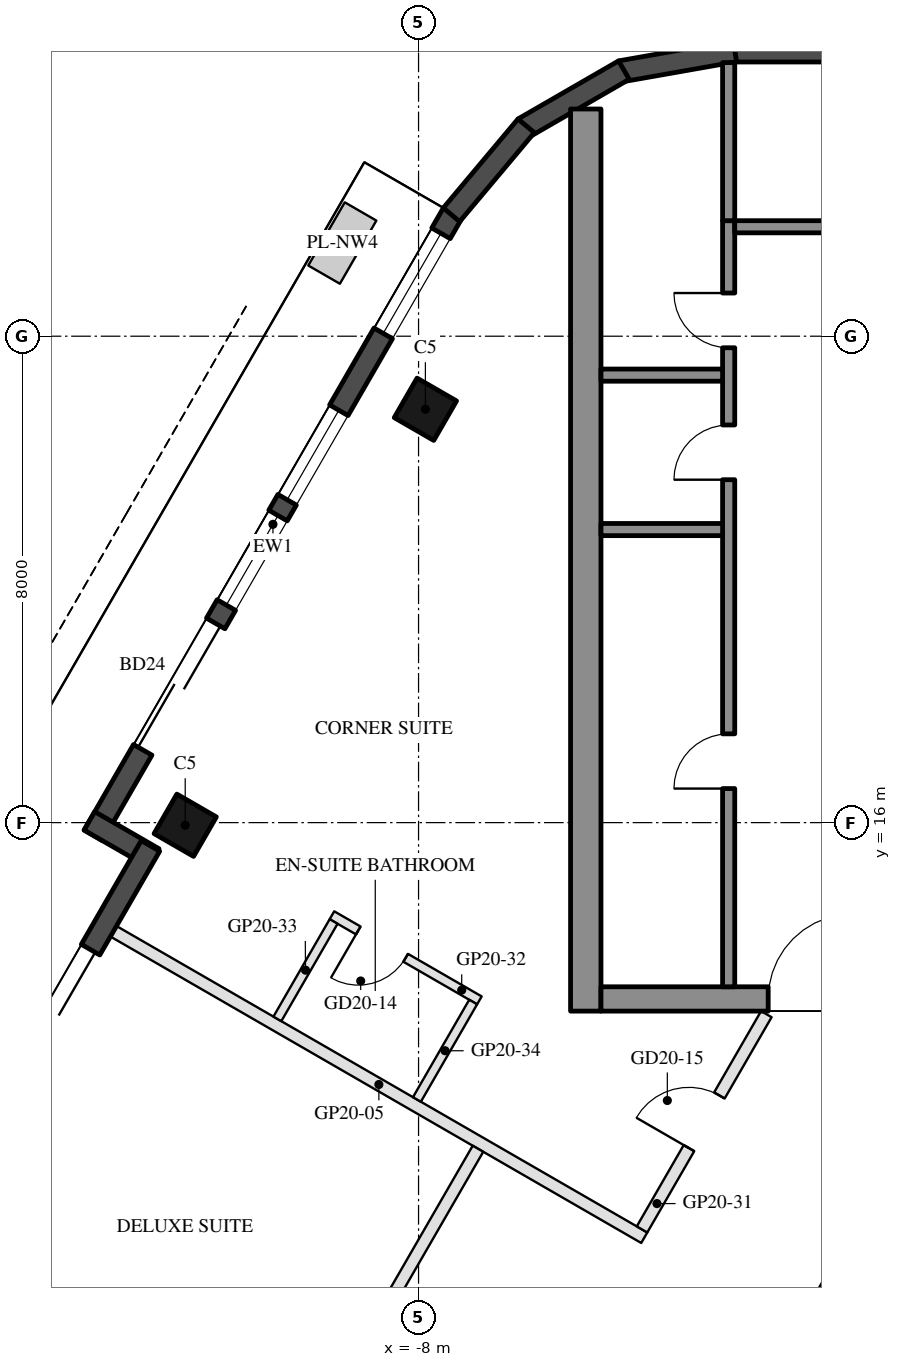
"""IFC4 building model, lengths in metres.
Left out: names, types, materials, properties, quantities, classifications, styles, units other than length and angle.
Written with IfcOpenShell. Run it as: python <this file> out.ifc"""

import sys

from ifc_helpers import new_model, si_unit, direction, frame, frame_2d, origin, origin_2d, place, context, subcontext, project, spatial, rectangle, hollow_rectangle, extrude, element, fill, save


model = new_model("IFC4")
c1 = context("Model", 3, precision=1e-05, world=origin(), true_north=direction((0.0, 1.0)))
c2 = subcontext(c1, "Body", "Model", "MODEL_VIEW")
j1 = project(units=[si_unit("LENGTHUNIT", "METRE"), si_unit("PLANEANGLEUNIT", "RADIAN")], contexts=[c1])
p1 = place(None, origin())
s1 = spatial("IfcSite", under=j1, at=p1, CompositionType="ELEMENT")
p2 = place(p1, origin())
s2 = spatial("IfcBuilding", under=s1, at=p2, CompositionType="ELEMENT")
p3 = place(p2, frame((0.0, 0.0, 209.5)))
s3 = spatial("IfcBuildingStorey", under=s2, at=p3, CompositionType="ELEMENT", Elevation=209.5)
for number, where, z_axis, x_axis in (
    (1, (-7.888, 22.798, 0.0), (0.0, 0.0, 1.0), (0.5, 0.866, 0.0)),
    (2, (-11.838, 15.957, 0.0), (0.0, 0.0, 1.0), (0.5, 0.866, 0.0)),
):
    element("IfcColumn", number, at=place(p3, frame(where, z_axis=z_axis, x_axis=x_axis)), inside=s3, PredefinedType="COLUMN", context=c2, shape_type="SweptSolid", body=[
        extrude(hollow_rectangle(XDim=0.75, YDim=0.75, WallThickness=0.035, at=origin_2d()), origin(), (0.0, 0.0, 1.0), 3.7),
    ])
p4 = place(p3, frame((-7.441, 26.022, 0.0), z_axis=(0.0, 0.0, 1.0), x_axis=(-0.499992533062, -0.86602971478, 0.0)))
e3 = element("IfcWall", 3, at=p4, inside=s3, PredefinedType="SOLIDWALL", context=c2, shape_type="SweptSolid", body=[
    extrude(rectangle(XDim=11.816, YDim=0.35, at=frame_2d((5.908, 0.0))), origin(), (0.0, 0.0, 1.0), 3.55),
])
p5 = place(p4, frame((0.381, 0.0, 0.3)))
e4 = element("IfcOpeningElement", 4, at=p5, cuts=e3, PredefinedType="OPENING", context=c2, shape_type="SweptSolid", body=[
    extrude(rectangle(XDim=1.9, YDim=2.65, at=frame_2d((0.95, 1.325))), frame((0.0, 0.185, 0.0), z_axis=(0.0, -1.0, 0.0), x_axis=(1.0, 0.0, 0.0)), (0.0, 0.0, 1.0), 0.37),
])
p6 = place(p4, frame((7.791, 0.0, 0.0)))
e5 = element("IfcOpeningElement", 5, at=p6, cuts=e3, PredefinedType="OPENING", context=c2, shape_type="SweptSolid", body=[
    extrude(rectangle(XDim=2.4, YDim=2.4, at=frame_2d((1.2, 1.2))), frame((0.0, 0.185, 0.0), z_axis=(0.0, -1.0, 0.0), x_axis=(1.0, 0.0, 0.0)), (0.0, 0.0, 1.0), 0.37),
])
p7 = place(p4, frame((3.741, 0.0, 0.3)))
e6 = element("IfcOpeningElement", 6, at=p7, cuts=e3, PredefinedType="OPENING", context=c2, shape_type="SweptSolid", body=[
    extrude(rectangle(XDim=1.7, YDim=2.65, at=frame_2d((0.85, 1.325))), frame((0.0, 0.185, 0.0), z_axis=(0.0, -1.0, 0.0), x_axis=(1.0, 0.0, 0.0)), (0.0, 0.0, 1.0), 0.37),
])
p8 = place(p4, frame((5.741, 0.0, 0.3)))
e7 = element("IfcOpeningElement", 7, at=p8, cuts=e3, PredefinedType="OPENING", context=c2, shape_type="SweptSolid", body=[
    extrude(rectangle(XDim=1.7, YDim=2.65, at=frame_2d((0.85, 1.325))), frame((0.0, 0.185, 0.0), z_axis=(0.0, -1.0, 0.0), x_axis=(1.0, 0.0, 0.0)), (0.0, 0.0, 1.0), 0.37),
])
p9 = place(p3, frame((-13.413, 16.029, 0.0), z_axis=(0.0, 0.0, 1.0), x_axis=(0.866005645448, -0.500034220881, 0.0)))
e8 = element("IfcWall", 8, at=p9, inside=s3, PredefinedType="SOLIDWALL", context=c2, shape_type="SweptSolid", body=[
    extrude(rectangle(XDim=1.22, YDim=0.35, at=frame_2d((0.61, 0.0))), origin(), (0.0, 0.0, 1.0), 3.55),
])
p10 = place(p3, frame((-12.409, 15.617, 0.0), z_axis=(0.0, 0.0, 1.0), x_axis=(-0.500003597184, -0.866023326939, 0.0)))
e9 = element("IfcWall", 9, at=p10, inside=s3, PredefinedType="SOLIDWALL", context=c2, shape_type="SweptSolid", body=[
    extrude(rectangle(XDim=6.74, YDim=0.35, at=frame_2d((3.37, 0.0))), origin(), (0.0, 0.0, 1.0), 3.55),
])
p11 = place(p10, frame((1.97, 0.0, 0.0)))
e10 = element("IfcOpeningElement", 10, at=p11, cuts=e9, PredefinedType="OPENING", context=c2, shape_type="SweptSolid", body=[
    extrude(rectangle(XDim=2.4, YDim=2.4, at=frame_2d((1.2, 1.2))), frame((0.0, 0.185, 0.0), z_axis=(0.0, -1.0, 0.0), x_axis=(1.0, 0.0, 0.0)), (0.0, 0.0, 1.0), 0.37),
])
p12 = place(p10, frame((4.67, 0.0, 0.3)))
e11 = element("IfcOpeningElement", 11, at=p12, cuts=e9, PredefinedType="OPENING", context=c2, shape_type="SweptSolid", body=[
    extrude(rectangle(XDim=1.2, YDim=2.65, at=frame_2d((0.6, 1.325))), frame((0.0, 0.185, 0.0), z_axis=(0.0, -1.0, 0.0), x_axis=(1.0, 0.0, 0.0)), (0.0, 0.0, 1.0), 0.37),
])
p13 = place(p3, frame((2.829, 28.685, 0.0), z_axis=(0.0, 0.0, 1.0), x_axis=(-1.0, 0.0, 0.0)))
e12 = element("IfcWall", 12, at=p13, inside=s3, PredefinedType="SOLIDWALL", context=c2, shape_type="SweptSolid", body=[
    extrude(rectangle(XDim=5.658, YDim=0.35, at=frame_2d((2.829, 0.0))), origin(), (0.0, 0.0, 1.0), 3.55),
])
for number, where, z_axis, x_axis in (
    (13, (-2.799, 28.688, 0.0), (0.0, 0.0, 1.0), (-0.985, -0.174, 0.0)),
    (14, (-4.623, 28.377, 0.0), (0.0, 0.0, 1.0), (-0.866, -0.5, 0.0)),
):
    element("IfcWall", number, at=place(p3, frame(where, z_axis=z_axis, x_axis=x_axis)), inside=s3, PredefinedType="SOLIDWALL", context=c2, shape_type="SweptSolid", body=[
        extrude(rectangle(XDim=1.91, YDim=0.35, at=frame_2d((0.955, 0.0))), origin(), (0.0, 0.0, 1.0), 3.55),
    ])
p14 = place(p3, frame((-6.23, 27.461, 0.0), z_axis=(0.0, 0.0, 1.0), x_axis=(-0.642808304945, -0.766027077259, 0.0)))
e15 = element("IfcWall", 15, at=p14, inside=s3, PredefinedType="SOLIDWALL", context=c2, shape_type="SweptSolid", body=[
    extrude(rectangle(XDim=1.91, YDim=0.35, at=frame_2d((0.955, 0.0))), origin(), (0.0, 0.0, 1.0), 3.55),
])
p15 = place(p3, frame((-5.25, 12.9, 0.0), z_axis=(0.0, 0.0, 1.0), x_axis=(0.0, 1.0, 0.0)))
e16 = element("IfcWall", 16, at=p15, inside=s3, PredefinedType="SHEAR", context=c2, shape_type="SweptSolid", body=[
    extrude(rectangle(XDim=14.837, YDim=0.5, at=frame_2d((7.418, 0.0))), origin(), (0.0, 0.0, 1.0), 3.5),
])
p16 = place(p3, frame((5.0, 13.1, 0.0), z_axis=(0.0, 0.0, 1.0), x_axis=(-1.0, 0.0, 0.0)))
e17 = element("IfcWall", 17, at=p16, inside=s3, PredefinedType="SHEAR", context=c2, shape_type="SweptSolid", body=[
    extrude(rectangle(XDim=10.0, YDim=0.4, at=frame_2d((5.0, 0.0))), origin(), (0.0, 0.0, 1.0), 3.5),
])
p17 = place(p16, frame((3.55, 0.0, 0.0)))
e18 = element("IfcOpeningElement", 18, at=p17, cuts=e17, PredefinedType="OPENING", context=c2, shape_type="SweptSolid", body=[
    extrude(rectangle(XDim=1.1, YDim=2.1, at=frame_2d((0.55, 1.05))), frame((0.0, 0.21, 0.0), z_axis=(0.0, -1.0, 0.0), x_axis=(1.0, 0.0, 0.0)), (0.0, 0.0, 1.0), 0.42),
])
p18 = place(p16, frame((5.85, 0.0, 0.0)))
e19 = element("IfcOpeningElement", 19, at=p18, cuts=e17, PredefinedType="OPENING", context=c2, shape_type="SweptSolid", body=[
    extrude(rectangle(XDim=1.4, YDim=2.1, at=frame_2d((0.7, 1.05))), frame((0.0, 0.21, 0.0), z_axis=(0.0, -1.0, 0.0), x_axis=(1.0, 0.0, 0.0)), (0.0, 0.0, 1.0), 0.42),
])
p19 = place(p3, frame((-2.9, 13.3, 0.0), z_axis=(0.0, 0.0, 1.0), x_axis=(0.0, 1.0, 0.0)))
e20 = element("IfcWall", 20, at=p19, inside=s3, PredefinedType="SHEAR", context=c2, shape_type="SweptSolid", body=[
    extrude(rectangle(XDim=12.6, YDim=0.2, at=frame_2d((6.3, 0.0))), origin(), (0.0, 0.0, 1.0), 3.5),
])
p20 = place(p19, frame((3.26, 0.0, 0.0)))
e21 = element("IfcOpeningElement", 21, at=p20, cuts=e20, PredefinedType="OPENING", context=c2, shape_type="SweptSolid", body=[
    extrude(rectangle(XDim=0.9, YDim=2.1, at=frame_2d((0.45, 1.05))), frame((0.0, 0.11, 0.0), z_axis=(0.0, -1.0, 0.0), x_axis=(1.0, 0.0, 0.0)), (0.0, 0.0, 1.0), 0.22),
])
p21 = place(p19, frame((8.34, 0.0, 0.0)))
e22 = element("IfcOpeningElement", 22, at=p21, cuts=e20, PredefinedType="OPENING", context=c2, shape_type="SweptSolid", body=[
    extrude(rectangle(XDim=0.9, YDim=2.1, at=frame_2d((0.45, 1.05))), frame((0.0, 0.11, 0.0), z_axis=(0.0, -1.0, 0.0), x_axis=(1.0, 0.0, 0.0)), (0.0, 0.0, 1.0), 0.22),
])
p22 = place(p19, frame((10.51, 0.0, 0.0)))
e23 = element("IfcOpeningElement", 23, at=p22, cuts=e20, PredefinedType="OPENING", context=c2, shape_type="SweptSolid", body=[
    extrude(rectangle(XDim=0.9, YDim=2.1, at=frame_2d((0.45, 1.05))), frame((0.0, 0.11, 0.0), z_axis=(0.0, -1.0, 0.0), x_axis=(1.0, 0.0, 0.0)), (0.0, 0.0, 1.0), 0.22),
])
p23 = place(p3, frame((-0.4, 25.8, 0.0), z_axis=(0.0, 0.0, 1.0), x_axis=(-1.0, 0.0, 0.0)))
e24 = element("IfcWall", 24, at=p23, inside=s3, PredefinedType="SHEAR", context=c2, shape_type="SweptSolid", body=[
    extrude(rectangle(XDim=2.4, YDim=0.2, at=frame_2d((1.2, 0.0))), origin(), (0.0, 0.0, 1.0), 3.5),
])
for number, where, z_axis, x_axis in (
    (25, (-3.0, 20.82, 0.0), (0.0, 0.0, 1.0), (-1.0, 0.0, 0.0)),
    (26, (-3.0, 23.36, 0.0), (0.0, 0.0, 1.0), (-1.0, 0.0, 0.0)),
):
    element("IfcWall", number, at=place(p3, frame(where, z_axis=z_axis, x_axis=x_axis)), inside=s3, PredefinedType="SHEAR", context=c2, shape_type="SweptSolid", body=[
        extrude(rectangle(XDim=2.0, YDim=0.2, at=frame_2d((1.0, 0.0))), origin(), (0.0, 0.0, 1.0), 3.5),
    ])
p24 = place(p3, frame((-2.9, 25.9, 0.0), z_axis=(0.0, 0.0, 1.0), x_axis=(0.0, 1.0, 0.0)))
e27 = element("IfcWall", 27, at=p24, inside=s3, PredefinedType="SHEAR", context=c2, shape_type="SweptSolid", body=[
    extrude(rectangle(XDim=2.6, YDim=0.2, at=frame_2d((1.3, 0.0))), origin(), (0.0, 0.0, 1.0), 3.5),
])
p25 = place(p3, frame((-13.018, 14.213, 0.0), z_axis=(0.0, 0.0, 1.0), x_axis=(0.866022637375, -0.500004791531, 0.0)))
e28 = element("IfcWall", 28, at=p25, inside=s3, PredefinedType="PARTITIONING", context=c2, shape_type="SweptSolid", body=[
    extrude(rectangle(XDim=10.08, YDim=0.2, at=frame_2d((5.04, 0.0))), origin(), (0.0, 0.0, 1.0), 3.06),
])
p26 = place(p3, frame((-4.325, 9.31, 0.0), z_axis=(0.0, 0.0, 1.0), x_axis=(0.500011931275, 0.86601851515, 0.0)))
e29 = element("IfcWall", 29, at=p26, inside=s3, PredefinedType="PARTITIONING", context=c2, shape_type="SweptSolid", body=[
    extrude(rectangle(XDim=4.088, YDim=0.2, at=frame_2d((2.044, 0.0))), origin(), (0.0, 0.0, 1.0), 2.95),
])
p27 = place(p26, frame((1.544, 0.0, 0.0)))
e30 = element("IfcOpeningElement", 30, at=p27, cuts=e29, PredefinedType="OPENING", context=c2, shape_type="SweptSolid", body=[
    extrude(rectangle(XDim=1.0, YDim=2.1, at=frame_2d((0.5, 1.05))), frame((0.0, 0.11, 0.0), z_axis=(0.0, -1.0, 0.0), x_axis=(1.0, 0.0, 0.0)), (0.0, 0.0, 1.0), 0.22),
])
p28 = place(p3, frame((-7.0, 13.077, 0.0), z_axis=(0.0, 0.0, 1.0), x_axis=(-0.866034573852, 0.49998411664, 0.0)))
e31 = element("IfcWall", 31, at=p28, inside=s3, PredefinedType="PARTITIONING", context=c2, shape_type="SweptSolid", body=[
    extrude(rectangle(XDim=2.8, YDim=0.15, at=frame_2d((1.4, 0.0))), origin(), (0.0, 0.0, 1.0), 2.95),
])
p29 = place(p28, frame((1.4, 0.0, 0.0)))
e32 = element("IfcOpeningElement", 32, at=p29, cuts=e31, PredefinedType="OPENING", context=c2, shape_type="SweptSolid", body=[
    extrude(rectangle(XDim=0.9, YDim=2.1, at=frame_2d((0.45, 1.05))), frame((0.0, 0.085, 0.0), z_axis=(0.0, -1.0, 0.0), x_axis=(1.0, 0.0, 0.0)), (0.0, 0.0, 1.0), 0.17),
])
for number, where, z_axis, x_axis in (
    (33, (-9.397, 14.374, 0.0), (0.0, 0.0, 1.0), (-0.5, -0.866, 0.0)),
    (34, (-7.102, 13.049, 0.0), (0.0, 0.0, 1.0), (-0.5, -0.866, 0.0)),
):
    element("IfcWall", number, at=place(p3, frame(where, z_axis=z_axis, x_axis=x_axis)), inside=s3, PredefinedType="PARTITIONING", context=c2, shape_type="SweptSolid", body=[
        extrude(rectangle(XDim=1.85, YDim=0.15, at=frame_2d((0.925, 0.0))), origin(), (0.0, 0.0, 1.0), 3.55),
    ])
p30 = place(p3, frame((-12.223, 1.63, 0.0), z_axis=(0.0, 0.0, 1.0), x_axis=(0.499999493275, 0.866025696342, 0.0)))
e35 = element("IfcWall", 35, at=p30, inside=s3, PredefinedType="PARTITIONING", context=c2, shape_type="SweptSolid", body=[
    extrude(rectangle(XDim=10.4, YDim=0.2, at=frame_2d((5.2, 0.0))), origin(), (0.0, 0.0, 1.0), 2.95),
])
p31 = place(p30, frame((2.45, 0.0, 0.0)))
e36 = element("IfcOpeningElement", 36, at=p31, cuts=e35, PredefinedType="OPENING", context=c2, shape_type="SweptSolid", body=[
    extrude(rectangle(XDim=1.0, YDim=2.1, at=frame_2d((0.5, 1.05))), frame((0.0, 0.11, 0.0), z_axis=(0.0, -1.0, 0.0), x_axis=(1.0, 0.0, 0.0)), (0.0, 0.0, 1.0), 0.22),
])
p32 = place(p5, origin())
e37 = element("IfcWindow", 37, at=p32, inside=s3, PartitioningType="SINGLE_PANEL", PredefinedType="WINDOW", context=c2, shape_type="SweptSolid", body=[
    extrude(rectangle(XDim=1.9, YDim=2.65, at=frame_2d((0.95, 1.325))), frame((0.0, 0.03, 0.0), z_axis=(0.0, -1.0, 0.0), x_axis=(1.0, 0.0, 0.0)), (0.0, 0.0, 1.0), 0.06),
])
fill(e4, e37)
p33 = place(p6, frame((2.4, 0.0, 0.0), z_axis=(0.0, 0.0, 1.0), x_axis=(-1.0, 0.0, 0.0)))
e38 = element("IfcDoor", 38, at=p33, inside=s3, OperationType="SLIDING_TO_LEFT", PredefinedType="DOOR", context=c2, shape_type="SweptSolid", body=[
    extrude(rectangle(XDim=2.4, YDim=2.4, at=frame_2d((1.2, 1.2))), frame((0.0, 0.025, 0.0), z_axis=(0.0, -1.0, 0.0), x_axis=(1.0, 0.0, 0.0)), (0.0, 0.0, 1.0), 0.05),
])
fill(e5, e38)
p34 = place(p7, origin())
e39 = element("IfcWindow", 39, at=p34, inside=s3, PartitioningType="SINGLE_PANEL", PredefinedType="WINDOW", context=c2, shape_type="SweptSolid", body=[
    extrude(rectangle(XDim=1.7, YDim=2.65, at=frame_2d((0.85, 1.325))), frame((0.0, 0.03, 0.0), z_axis=(0.0, -1.0, 0.0), x_axis=(1.0, 0.0, 0.0)), (0.0, 0.0, 1.0), 0.06),
])
fill(e6, e39)
p35 = place(p8, origin())
e40 = element("IfcWindow", 40, at=p35, inside=s3, PartitioningType="SINGLE_PANEL", PredefinedType="WINDOW", context=c2, shape_type="SweptSolid", body=[
    extrude(rectangle(XDim=1.7, YDim=2.65, at=frame_2d((0.85, 1.325))), frame((0.0, 0.03, 0.0), z_axis=(0.0, -1.0, 0.0), x_axis=(1.0, 0.0, 0.0)), (0.0, 0.0, 1.0), 0.06),
])
fill(e7, e40)
p36 = place(p11, frame((2.4, 0.0, 0.0), z_axis=(0.0, 0.0, 1.0), x_axis=(-1.0, 0.0, 0.0)))
e41 = element("IfcDoor", 41, at=p36, inside=s3, OperationType="SLIDING_TO_LEFT", PredefinedType="DOOR", context=c2, shape_type="SweptSolid", body=[
    extrude(rectangle(XDim=2.4, YDim=2.4, at=frame_2d((1.2, 1.2))), frame((0.0, 0.025, 0.0), z_axis=(0.0, -1.0, 0.0), x_axis=(1.0, 0.0, 0.0)), (0.0, 0.0, 1.0), 0.05),
])
fill(e10, e41)
p37 = place(p20, origin())
e42 = element("IfcDoor", 42, at=p37, inside=s3, OperationType="SINGLE_SWING_LEFT", PredefinedType="DOOR", context=c2, shape_type="SweptSolid", body=[
    extrude(rectangle(XDim=0.9, YDim=2.1, at=frame_2d((0.45, 1.05))), frame((0.0, 0.025, 0.0), z_axis=(0.0, -1.0, 0.0), x_axis=(1.0, 0.0, 0.0)), (0.0, 0.0, 1.0), 0.05),
])
fill(e21, e42)
p38 = place(p21, origin())
e43 = element("IfcDoor", 43, at=p38, inside=s3, OperationType="SINGLE_SWING_LEFT", PredefinedType="DOOR", context=c2, shape_type="SweptSolid", body=[
    extrude(rectangle(XDim=0.9, YDim=2.1, at=frame_2d((0.45, 1.05))), frame((0.0, 0.025, 0.0), z_axis=(0.0, -1.0, 0.0), x_axis=(1.0, 0.0, 0.0)), (0.0, 0.0, 1.0), 0.05),
])
fill(e22, e43)
p39 = place(p22, origin())
e44 = element("IfcDoor", 44, at=p39, inside=s3, OperationType="SINGLE_SWING_RIGHT", PredefinedType="DOOR", context=c2, shape_type="SweptSolid", body=[
    extrude(rectangle(XDim=0.9, YDim=2.1, at=frame_2d((0.45, 1.05))), frame((0.0, 0.025, 0.0), z_axis=(0.0, -1.0, 0.0), x_axis=(1.0, 0.0, 0.0)), (0.0, 0.0, 1.0), 0.05),
])
fill(e23, e44)
p40 = place(p18, frame((1.4, 0.0, 0.0), z_axis=(0.0, 0.0, 1.0), x_axis=(-1.0, 0.0, 0.0)))
e45 = element("IfcDoor", 45, at=p40, inside=s3, OperationType="DOUBLE_DOOR_SINGLE_SWING", PredefinedType="DOOR", context=c2, shape_type="SweptSolid", body=[
    extrude(rectangle(XDim=1.4, YDim=2.1, at=frame_2d((0.7, 1.05))), frame((0.0, 0.025, 0.0), z_axis=(0.0, -1.0, 0.0), x_axis=(1.0, 0.0, 0.0)), (0.0, 0.0, 1.0), 0.05),
])
fill(e19, e45)
p41 = place(p29, origin())
e46 = element("IfcDoor", 46, at=p41, inside=s3, OperationType="SINGLE_SWING_RIGHT", PredefinedType="DOOR", context=c2, shape_type="SweptSolid", body=[
    extrude(rectangle(XDim=0.9, YDim=2.1, at=frame_2d((0.45, 1.05))), frame((0.0, 0.025, 0.0), z_axis=(0.0, -1.0, 0.0), x_axis=(1.0, 0.0, 0.0)), (0.0, 0.0, 1.0), 0.05),
])
fill(e32, e46)
p42 = place(p27, origin())
e47 = element("IfcDoor", 47, at=p42, inside=s3, OperationType="SINGLE_SWING_LEFT", PredefinedType="DOOR", context=c2, shape_type="SweptSolid", body=[
    extrude(rectangle(XDim=1.0, YDim=2.1, at=frame_2d((0.5, 1.05))), frame((0.0, 0.025, 0.0), z_axis=(0.0, -1.0, 0.0), x_axis=(1.0, 0.0, 0.0)), (0.0, 0.0, 1.0), 0.05),
])
fill(e30, e47)
save(model, sys.argv[1])
